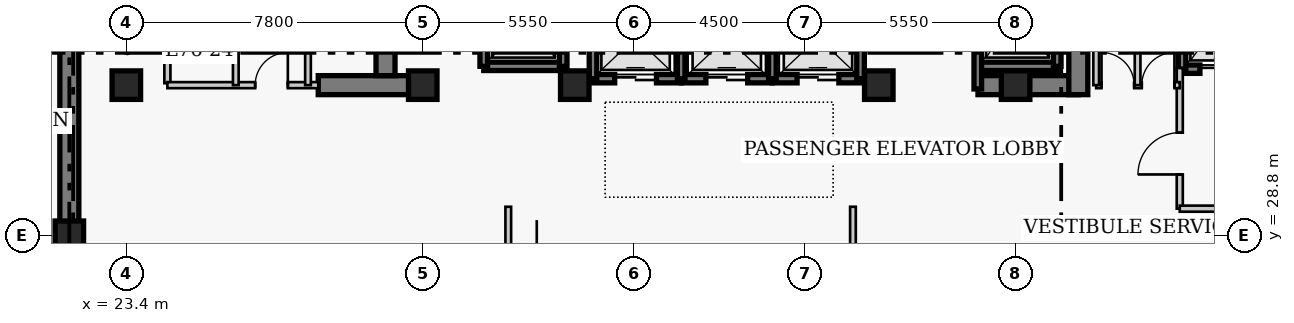
"""IFC4 building model, lengths in metres.
Left out: names, types, materials, properties, quantities, classifications, styles, units other than length and angle.
Written with IfcOpenShell. Run it as: python <this file> out.ifc"""

import sys

from ifc_helpers import new_model, si_unit, direction, frame, frame_2d, origin, origin_2d, place, context, subcontext, project, spatial, rectangle, extrude, element, fill, save


model = new_model("IFC4")
c1 = context("Model", 3, precision=1e-05, world=origin(), true_north=direction((0.0, 1.0)))
c2 = subcontext(c1, "Body", "Model", "MODEL_VIEW")
j1 = project(units=[si_unit("LENGTHUNIT", "METRE"), si_unit("PLANEANGLEUNIT", "RADIAN")], contexts=[c1])
p1 = place(None, origin())
s1 = spatial("IfcSite", under=j1, at=p1, CompositionType="ELEMENT")
p2 = place(p1, origin())
s2 = spatial("IfcBuilding", under=s1, at=p2, CompositionType="ELEMENT")
p3 = place(p2, frame((0.0, 0.0, 306.6)))
s3 = spatial("IfcBuildingStorey", under=s2, at=p3, CompositionType="ELEMENT", Elevation=306.6)
p4 = place(p3, frame((21.9, 27.05, 0.0), z_axis=(0.0, 0.0, 1.0), x_axis=(0.0, 1.0, 0.0)))
e1 = element("IfcWall", 1, at=p4, inside=s3, PredefinedType="SHEAR", context=c2, shape_type="SweptSolid", body=[
    extrude(rectangle(XDim=13.52, YDim=0.5, at=frame_2d((6.76, 0.0))), origin(), (0.0, 0.0, 1.0), 4.8),
])
p5 = place(p3, frame((28.45, 32.75, 0.0), z_axis=(0.0, 0.0, 1.0), x_axis=(1.0, 0.0, 0.0)))
e2 = element("IfcWall", 2, at=p5, inside=s3, PredefinedType="SHEAR", context=c2, shape_type="SweptSolid", body=[
    extrude(rectangle(XDim=2.4, YDim=0.5, at=frame_2d((1.2, 0.0))), origin(), (0.0, 0.0, 1.0), 4.8),
])
p6 = place(p3, frame((45.81, 32.75, 0.0), z_axis=(0.0, 0.0, 1.0), x_axis=(1.0, 0.0, 0.0)))
e3 = element("IfcWall", 3, at=p6, inside=s3, PredefinedType="SHEAR", context=c2, shape_type="SweptSolid", body=[
    extrude(rectangle(XDim=2.64, YDim=0.5, at=frame_2d((1.32, 0.0))), origin(), (0.0, 0.0, 1.0), 4.8),
])
p7 = place(p3, frame((30.22, 33.0, 0.0), z_axis=(0.0, 0.0, 1.0), x_axis=(0.0, 1.0, 0.0)))
e4 = element("IfcWall", 4, at=p7, inside=s3, PredefinedType="SHEAR", context=c2, shape_type="SweptSolid", body=[
    extrude(rectangle(XDim=7.32, YDim=0.5, at=frame_2d((3.66, 0.0))), origin(), (0.0, 0.0, 1.0), 4.8),
])
p8 = place(p3, frame((48.45, 32.5, 0.0), z_axis=(0.0, 0.0, 1.0), x_axis=(0.0, 1.0, 0.0)))
e5 = element("IfcWall", 5, at=p8, inside=s3, PredefinedType="SHEAR", context=c2, shape_type="SweptSolid", body=[
    extrude(rectangle(XDim=7.82, YDim=0.5, at=frame_2d((3.91, 0.0))), origin(), (0.0, 0.0, 1.0), 4.8),
])
p9 = place(p8, frame((5.7, 0.0, 0.0)))
e6 = element("IfcOpeningElement", 6, at=p9, cuts=e5, PredefinedType="OPENING", context=c2, shape_type="SweptSolid", body=[
    extrude(rectangle(XDim=1.1, YDim=2.15, at=frame_2d((0.55, 1.075))), frame((0.0, 0.26, 0.0), z_axis=(0.0, -1.0, 0.0), x_axis=(1.0, 0.0, 0.0)), (0.0, 0.0, 1.0), 0.52),
])
for number, where, z_axis, x_axis in (
    (7, (21.9, 28.8, 0.0), (0.0, 0.0, 1.0), (1.0, 0.0, 0.0)),
    (8, (23.4, 32.75, 0.0), (0.0, 0.0, 1.0), (1.0, 0.0, 0.0)),
    (9, (31.2, 32.75, 0.0), (0.0, 0.0, 1.0), (1.0, 0.0, 0.0)),
    (10, (35.2, 32.75, 0.0), (0.0, 0.0, 1.0), (1.0, 0.0, 0.0)),
    (11, (43.2, 32.75, 0.0), (0.0, 0.0, 1.0), (1.0, 0.0, 0.0)),
    (12, (46.8, 32.75, 0.0), (0.0, 0.0, 1.0), (1.0, 0.0, 0.0)),
):
    element("IfcColumn", number, at=place(p3, frame(where, z_axis=z_axis, x_axis=x_axis)), inside=s3, PredefinedType="COLUMN", context=c2, shape_type="SweptSolid", body=[
        extrude(rectangle(XDim=0.75, YDim=0.75, at=origin_2d()), origin(), (0.0, 0.0, 1.0), 4.8),
    ])
p10 = place(p3, frame((35.68, 32.92, 0.0), z_axis=(0.0, 0.0, 1.0), x_axis=(1.0, 0.0, 0.0)))
e13 = element("IfcWall", 13, at=p10, inside=s3, PredefinedType="SHEAR", context=c2, shape_type="SweptSolid", body=[
    extrude(rectangle(XDim=2.32, YDim=0.22, at=frame_2d((1.16, 0.0))), origin(), (0.0, 0.0, 1.0), 4.8),
])
p11 = place(p10, frame((0.57, 0.0, 0.0)))
e14 = element("IfcOpeningElement", 14, at=p11, cuts=e13, PredefinedType="OPENING", context=c2, shape_type="SweptSolid", body=[
    extrude(rectangle(XDim=1.1, YDim=2.15, at=frame_2d((0.55, 1.075))), frame((0.0, 0.12, 0.0), z_axis=(0.0, -1.0, 0.0), x_axis=(1.0, 0.0, 0.0)), (0.0, 0.0, 1.0), 0.24),
])
p12 = place(p3, frame((35.68, 32.92, 0.0), z_axis=(0.0, 0.0, 1.0), x_axis=(0.0, 1.0, 0.0)))
e15 = element("IfcWall", 15, at=p12, inside=s3, PredefinedType="SHEAR", context=c2, shape_type="SweptSolid", body=[
    extrude(rectangle(XDim=2.16, YDim=0.2, at=frame_2d((1.08, 0.0))), origin(), (0.0, 0.0, 1.0), 4.8),
])
p13 = place(p3, frame((38.0, 32.92, 0.0), z_axis=(0.0, 0.0, 1.0), x_axis=(1.0, 0.0, 0.0)))
e16 = element("IfcWall", 16, at=p13, inside=s3, PredefinedType="SHEAR", context=c2, shape_type="SweptSolid", body=[
    extrude(rectangle(XDim=2.4, YDim=0.22, at=frame_2d((1.2, 0.0))), origin(), (0.0, 0.0, 1.0), 4.8),
])
p14 = place(p13, frame((0.65, 0.0, 0.0)))
e17 = element("IfcOpeningElement", 17, at=p14, cuts=e16, PredefinedType="OPENING", context=c2, shape_type="SweptSolid", body=[
    extrude(rectangle(XDim=1.1, YDim=2.15, at=frame_2d((0.55, 1.075))), frame((0.0, 0.12, 0.0), z_axis=(0.0, -1.0, 0.0), x_axis=(1.0, 0.0, 0.0)), (0.0, 0.0, 1.0), 0.24),
])
p15 = place(p3, frame((38.0, 32.92, 0.0), z_axis=(0.0, 0.0, 1.0), x_axis=(0.0, 1.0, 0.0)))
e18 = element("IfcWall", 18, at=p15, inside=s3, PredefinedType="SHEAR", context=c2, shape_type="SweptSolid", body=[
    extrude(rectangle(XDim=2.16, YDim=0.2, at=frame_2d((1.08, 0.0))), origin(), (0.0, 0.0, 1.0), 4.8),
])
p16 = place(p3, frame((40.4, 32.92, 0.0), z_axis=(0.0, 0.0, 1.0), x_axis=(1.0, 0.0, 0.0)))
e19 = element("IfcWall", 19, at=p16, inside=s3, PredefinedType="SHEAR", context=c2, shape_type="SweptSolid", body=[
    extrude(rectangle(XDim=2.32, YDim=0.22, at=frame_2d((1.16, 0.0))), origin(), (0.0, 0.0, 1.0), 4.8),
])
p17 = place(p16, frame((0.65, 0.0, 0.0)))
e20 = element("IfcOpeningElement", 20, at=p17, cuts=e19, PredefinedType="OPENING", context=c2, shape_type="SweptSolid", body=[
    extrude(rectangle(XDim=1.1, YDim=2.15, at=frame_2d((0.55, 1.075))), frame((0.0, 0.12, 0.0), z_axis=(0.0, -1.0, 0.0), x_axis=(1.0, 0.0, 0.0)), (0.0, 0.0, 1.0), 0.24),
])
for number, where, z_axis, x_axis in (
    (21, (40.4, 32.92, 0.0), (0.0, 0.0, 1.0), (0.0, 1.0, 0.0)),
    (22, (42.72, 32.92, 0.0), (0.0, 0.0, 1.0), (0.0, 1.0, 0.0)),
):
    element("IfcWall", number, at=place(p3, frame(where, z_axis=z_axis, x_axis=x_axis)), inside=s3, PredefinedType="SHEAR", context=c2, shape_type="SweptSolid", body=[
        extrude(rectangle(XDim=2.16, YDim=0.2, at=frame_2d((1.08, 0.0))), origin(), (0.0, 0.0, 1.0), 4.8),
    ])
p18 = place(p3, frame((51.18, 33.17, 0.0), z_axis=(0.0, 0.0, 1.0), x_axis=(1.0, 0.0, 0.0)))
e23 = element("IfcWall", 23, at=p18, inside=s3, PredefinedType="SHEAR", context=c2, shape_type="SweptSolid", body=[
    extrude(rectangle(XDim=2.42, YDim=0.22, at=frame_2d((1.21, 0.0))), origin(), (0.0, 0.0, 1.0), 4.8),
])
p19 = place(p18, frame((0.47, 0.0, 0.0)))
e24 = element("IfcOpeningElement", 24, at=p19, cuts=e23, PredefinedType="OPENING", context=c2, shape_type="SweptSolid", body=[
    extrude(rectangle(XDim=1.3, YDim=2.15, at=frame_2d((0.65, 1.075))), frame((0.0, 0.12, 0.0), z_axis=(0.0, -1.0, 0.0), x_axis=(1.0, 0.0, 0.0)), (0.0, 0.0, 1.0), 0.24),
])
p20 = place(p3, frame((51.18, 33.17, 0.0), z_axis=(0.0, 0.0, 1.0), x_axis=(0.0, 1.0, 0.0)))
e25 = element("IfcWall", 25, at=p20, inside=s3, PredefinedType="SHEAR", context=c2, shape_type="SweptSolid", body=[
    extrude(rectangle(XDim=2.86, YDim=0.2, at=frame_2d((1.43, 0.0))), origin(), (0.0, 0.0, 1.0), 4.8),
])
p21 = place(p3, frame((32.805, 33.245, 0.0), z_axis=(0.0, 0.0, 1.0), x_axis=(1.0, 0.0, 0.0)))
e26 = element("IfcWall", 26, at=p21, inside=s3, PredefinedType="SHEAR", context=c2, shape_type="SweptSolid", body=[
    extrude(rectangle(XDim=2.09, YDim=0.22, at=frame_2d((1.045, 0.0))), origin(), (0.0, 0.0, 1.0), 4.8),
])
for number, where, z_axis, x_axis in (
    (27, (32.805, 33.245, 0.0), (0.0, 0.0, 1.0), (0.0, 1.0, 0.0)),
    (28, (34.895, 33.245, 0.0), (0.0, 0.0, 1.0), (0.0, 1.0, 0.0)),
):
    element("IfcWall", number, at=place(p3, frame(where, z_axis=z_axis, x_axis=x_axis)), inside=s3, PredefinedType="SHEAR", context=c2, shape_type="SweptSolid", body=[
        extrude(rectangle(XDim=2.91, YDim=0.2, at=frame_2d((1.455, 0.0))), origin(), (0.0, 0.0, 1.0), 4.8),
    ])
p22 = place(p3, frame((45.805, 33.245, 0.0), z_axis=(0.0, 0.0, 1.0), x_axis=(1.0, 0.0, 0.0)))
e29 = element("IfcWall", 29, at=p22, inside=s3, PredefinedType="SHEAR", context=c2, shape_type="SweptSolid", body=[
    extrude(rectangle(XDim=2.09, YDim=0.22, at=frame_2d((1.045, 0.0))), origin(), (0.0, 0.0, 1.0), 4.8),
])
p23 = place(p3, frame((45.805, 32.65, 0.0), z_axis=(0.0, 0.0, 1.0), x_axis=(0.0, 1.0, 0.0)))
e30 = element("IfcWall", 30, at=p23, inside=s3, PredefinedType="SHEAR", context=c2, shape_type="SweptSolid", body=[
    extrude(rectangle(XDim=3.505, YDim=0.2, at=frame_2d((1.752, 0.0))), origin(), (0.0, 0.0, 1.0), 4.8),
])
p24 = place(p3, frame((47.895, 33.245, 0.0), z_axis=(0.0, 0.0, 1.0), x_axis=(0.0, 1.0, 0.0)))
e31 = element("IfcWall", 31, at=p24, inside=s3, PredefinedType="SHEAR", context=c2, shape_type="SweptSolid", body=[
    extrude(rectangle(XDim=2.91, YDim=0.2, at=frame_2d((1.455, 0.0))), origin(), (0.0, 0.0, 1.0), 4.8),
])
p25 = place(p3, frame((24.48, 32.8, 0.0), z_axis=(0.0, 0.0, 1.0), x_axis=(0.0, 1.0, 0.0)))
e32 = element("IfcWall", 32, at=p25, inside=s3, PredefinedType="PARTITIONING", context=c2, shape_type="SweptSolid", body=[
    extrude(rectangle(XDim=3.57, YDim=0.16, at=frame_2d((1.785, 0.0))), origin(), (0.0, 0.0, 1.0), 4.45),
])
p26 = place(p25, frame((1.604, 0.0, 0.0)))
e33 = element("IfcOpeningElement", 33, at=p26, cuts=e32, PredefinedType="OPENING", context=c2, shape_type="SweptSolid", body=[
    extrude(rectangle(XDim=0.9, YDim=2.1, at=frame_2d((0.45, 1.05))), frame((0.0, 0.09, 0.0), z_axis=(0.0, -1.0, 0.0), x_axis=(1.0, 0.0, 0.0)), (0.0, 0.0, 1.0), 0.18),
])
p27 = place(p3, frame((51.12, 29.5, 0.0), z_axis=(0.0, 0.0, 1.0), x_axis=(0.0, 1.0, 0.0)))
e34 = element("IfcWall", 34, at=p27, inside=s3, PredefinedType="PARTITIONING", context=c2, shape_type="SweptSolid", body=[
    extrude(rectangle(XDim=3.7, YDim=0.16, at=frame_2d((1.85, 0.0))), origin(), (0.0, 0.0, 1.0), 4.45),
])
p28 = place(p27, frame((0.9, 0.0, 0.0)))
e35 = element("IfcOpeningElement", 35, at=p28, cuts=e34, PredefinedType="OPENING", context=c2, shape_type="SweptSolid", body=[
    extrude(rectangle(XDim=1.1, YDim=2.15, at=frame_2d((0.55, 1.075))), frame((0.0, 0.09, 0.0), z_axis=(0.0, -1.0, 0.0), x_axis=(1.0, 0.0, 0.0)), (0.0, 0.0, 1.0), 0.18),
])
p29 = place(p3, frame((51.12, 29.5, 0.0), z_axis=(0.0, 0.0, 1.0), x_axis=(1.0, 0.0, 0.0)))
e36 = element("IfcWall", 36, at=p29, inside=s3, PredefinedType="PARTITIONING", context=c2, shape_type="SweptSolid", body=[
    extrude(rectangle(XDim=5.63, YDim=0.16, at=frame_2d((2.815, 0.0))), origin(), (0.0, 0.0, 1.0), 4.45),
])
p30 = place(p3, frame((24.48, 32.75, 0.0), z_axis=(0.0, 0.0, 1.0), x_axis=(1.0, 0.0, 0.0)))
e37 = element("IfcWall", 37, at=p30, inside=s3, PredefinedType="PARTITIONING", context=c2, shape_type="SweptSolid", body=[
    extrude(rectangle(XDim=3.97, YDim=0.16, at=frame_2d((1.985, 0.0))), origin(), (0.0, 0.0, 1.0), 4.45),
])
p31 = place(p30, frame((2.31, 0.0, 0.0)))
e38 = element("IfcOpeningElement", 38, at=p31, cuts=e37, PredefinedType="OPENING", context=c2, shape_type="SweptSolid", body=[
    extrude(rectangle(XDim=0.86, YDim=2.05, at=frame_2d((0.43, 1.025))), frame((0.0, 0.09, 0.0), z_axis=(0.0, -1.0, 0.0), x_axis=(1.0, 0.0, 0.0)), (0.0, 0.0, 1.0), 0.18),
])
p32 = place(p3, frame((48.92, 32.75, 0.0), z_axis=(0.0, 0.0, 1.0), x_axis=(1.0, 0.0, 0.0)))
e39 = element("IfcWall", 39, at=p32, inside=s3, PredefinedType="PARTITIONING", context=c2, shape_type="SweptSolid", body=[
    extrude(rectangle(XDim=2.2, YDim=0.16, at=frame_2d((1.1, 0.0))), origin(), (0.0, 0.0, 1.0), 4.45),
])
p33 = place(p32, frame((0.14, 0.0, 0.0)))
e40 = element("IfcOpeningElement", 40, at=p33, cuts=e39, PredefinedType="OPENING", context=c2, shape_type="SweptSolid", body=[
    extrude(rectangle(XDim=0.86, YDim=2.05, at=frame_2d((0.43, 1.025))), frame((0.0, 0.09, 0.0), z_axis=(0.0, -1.0, 0.0), x_axis=(1.0, 0.0, 0.0)), (0.0, 0.0, 1.0), 0.18),
])
p34 = place(p32, frame((1.2, 0.0, 0.0)))
e41 = element("IfcOpeningElement", 41, at=p34, cuts=e39, PredefinedType="OPENING", context=c2, shape_type="SweptSolid", body=[
    extrude(rectangle(XDim=0.86, YDim=2.05, at=frame_2d((0.43, 1.025))), frame((0.0, 0.09, 0.0), z_axis=(0.0, -1.0, 0.0), x_axis=(1.0, 0.0, 0.0)), (0.0, 0.0, 1.0), 0.18),
])
for number, where, z_axis, x_axis in (
    (42, (48.92, 32.75, 0.0), (0.0, 0.0, 1.0), (0.0, 1.0, 0.0)),
    (43, (26.28, 32.75, 0.0), (0.0, 0.0, 1.0), (0.0, 1.0, 0.0)),
    (44, (28.18, 32.75, 0.0), (0.0, 0.0, 1.0), (0.0, 1.0, 0.0)),
    (45, (50.01, 32.75, 0.0), (0.0, 0.0, 1.0), (0.0, 1.0, 0.0)),
):
    element("IfcWall", number, at=place(p3, frame(where, z_axis=z_axis, x_axis=x_axis)), inside=s3, PredefinedType="PARTITIONING", context=c2, shape_type="SweptSolid", body=[
        extrude(rectangle(XDim=3.62, YDim=0.15, at=frame_2d((1.81, 0.0))), origin(), (0.0, 0.0, 1.0), 4.45),
    ])
for number, where, z_axis, x_axis in (
    (46, (33.45, 24.18, 0.0), (0.0, 0.0, 1.0), (0.0, 1.0, 0.0)),
    (47, (42.52, 24.18, 0.0), (0.0, 0.0, 1.0), (0.0, 1.0, 0.0)),
):
    element("IfcWall", number, at=place(p3, frame(where, z_axis=z_axis, x_axis=x_axis)), inside=s3, PredefinedType="PARTITIONING", context=c2, shape_type="SweptSolid", body=[
        extrude(rectangle(XDim=5.37, YDim=0.15, at=frame_2d((2.685, 0.0))), origin(), (0.0, 0.0, 1.0), 4.45),
    ])
p35 = place(p11, origin())
e48 = element("IfcDoor", 48, at=p35, inside=s3, OperationType="DOUBLE_DOOR_SLIDING", PredefinedType="DOOR", context=c2, shape_type="SweptSolid", body=[
    extrude(rectangle(XDim=1.1, YDim=2.15, at=frame_2d((0.55, 1.075))), frame((0.0, 0.025, 0.0), z_axis=(0.0, -1.0, 0.0), x_axis=(1.0, 0.0, 0.0)), (0.0, 0.0, 1.0), 0.05),
])
fill(e14, e48)
p36 = place(p14, origin())
e49 = element("IfcDoor", 49, at=p36, inside=s3, OperationType="DOUBLE_DOOR_SLIDING", PredefinedType="DOOR", context=c2, shape_type="SweptSolid", body=[
    extrude(rectangle(XDim=1.1, YDim=2.15, at=frame_2d((0.55, 1.075))), frame((0.0, 0.025, 0.0), z_axis=(0.0, -1.0, 0.0), x_axis=(1.0, 0.0, 0.0)), (0.0, 0.0, 1.0), 0.05),
])
fill(e17, e49)
p37 = place(p17, origin())
e50 = element("IfcDoor", 50, at=p37, inside=s3, OperationType="DOUBLE_DOOR_SLIDING", PredefinedType="DOOR", context=c2, shape_type="SweptSolid", body=[
    extrude(rectangle(XDim=1.1, YDim=2.15, at=frame_2d((0.55, 1.075))), frame((0.0, 0.025, 0.0), z_axis=(0.0, -1.0, 0.0), x_axis=(1.0, 0.0, 0.0)), (0.0, 0.0, 1.0), 0.05),
])
fill(e20, e50)
p38 = place(p19, origin())
e51 = element("IfcDoor", 51, at=p38, inside=s3, OperationType="DOUBLE_DOOR_SLIDING", PredefinedType="DOOR", context=c2, shape_type="SweptSolid", body=[
    extrude(rectangle(XDim=1.3, YDim=2.15, at=frame_2d((0.65, 1.075))), frame((0.0, 0.025, 0.0), z_axis=(0.0, -1.0, 0.0), x_axis=(1.0, 0.0, 0.0)), (0.0, 0.0, 1.0), 0.05),
])
fill(e24, e51)
p39 = place(p28, origin())
e52 = element("IfcDoor", 52, at=p39, inside=s3, OperationType="SINGLE_SWING_LEFT", PredefinedType="DOOR", context=c2, shape_type="SweptSolid", body=[
    extrude(rectangle(XDim=1.1, YDim=2.15, at=frame_2d((0.55, 1.075))), frame((0.0, 0.025, 0.0), z_axis=(0.0, -1.0, 0.0), x_axis=(1.0, 0.0, 0.0)), (0.0, 0.0, 1.0), 0.05),
])
fill(e35, e52)
p40 = place(p31, origin())
e53 = element("IfcDoor", 53, at=p40, inside=s3, OperationType="SINGLE_SWING_RIGHT", PredefinedType="DOOR", context=c2, shape_type="SweptSolid", body=[
    extrude(rectangle(XDim=0.86, YDim=2.05, at=frame_2d((0.43, 1.025))), frame((0.0, 0.025, 0.0), z_axis=(0.0, -1.0, 0.0), x_axis=(1.0, 0.0, 0.0)), (0.0, 0.0, 1.0), 0.05),
])
fill(e38, e53)
p41 = place(p33, origin())
e54 = element("IfcDoor", 54, at=p41, inside=s3, OperationType="SINGLE_SWING_LEFT", PredefinedType="DOOR", context=c2, shape_type="SweptSolid", body=[
    extrude(rectangle(XDim=0.86, YDim=2.05, at=frame_2d((0.43, 1.025))), frame((0.0, 0.025, 0.0), z_axis=(0.0, -1.0, 0.0), x_axis=(1.0, 0.0, 0.0)), (0.0, 0.0, 1.0), 0.05),
])
fill(e40, e54)
p42 = place(p34, origin())
e55 = element("IfcDoor", 55, at=p42, inside=s3, OperationType="SINGLE_SWING_RIGHT", PredefinedType="DOOR", context=c2, shape_type="SweptSolid", body=[
    extrude(rectangle(XDim=0.86, YDim=2.05, at=frame_2d((0.43, 1.025))), frame((0.0, 0.025, 0.0), z_axis=(0.0, -1.0, 0.0), x_axis=(1.0, 0.0, 0.0)), (0.0, 0.0, 1.0), 0.05),
])
fill(e41, e55)
save(model, sys.argv[1])
